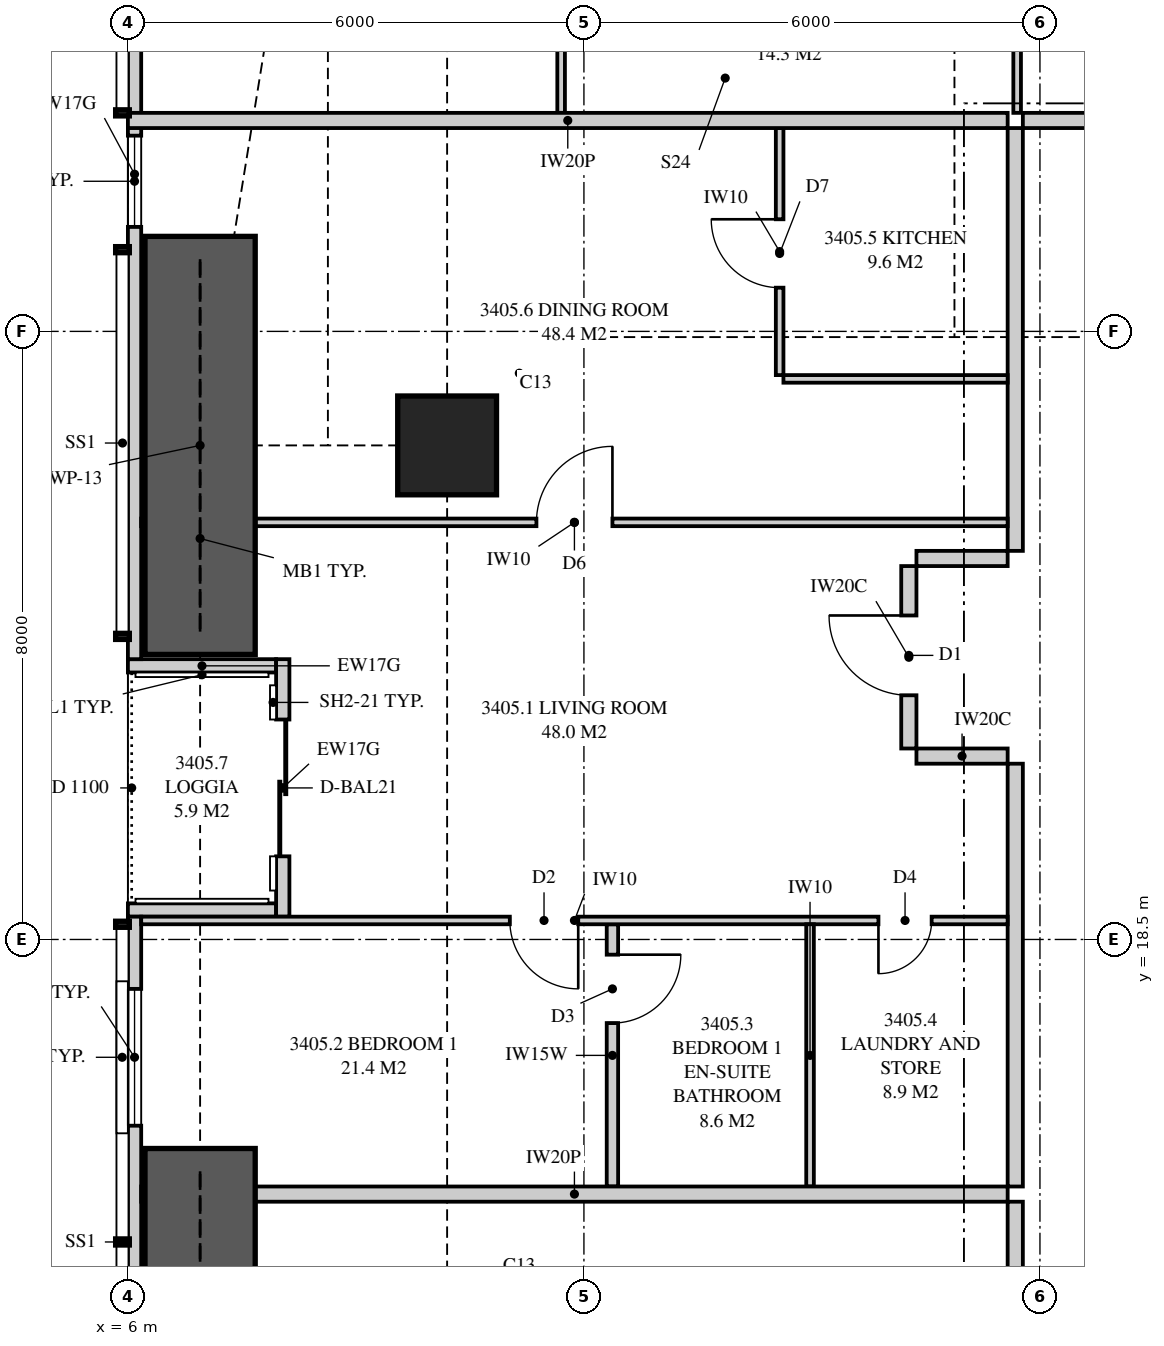
"""IFC4 building model, lengths in metres.
Left out: names, types, materials, properties, quantities, classifications, styles, units other than length and angle.
Written with IfcOpenShell. Run it as: python <this file> out.ifc"""

import sys

from ifc_helpers import new_model, si_unit, direction, frame, frame_2d, origin, origin_2d, place, context, subcontext, project, spatial, polyline, rectangle, outline, extrude, element, fill, save


model = new_model("IFC4")
c1 = context("Model", 3, precision=1e-05, world=origin(), true_north=direction((0.0, 1.0)))
c2 = subcontext(c1, "Body", "Model", "MODEL_VIEW")
j1 = project(units=[si_unit("LENGTHUNIT", "METRE"), si_unit("PLANEANGLEUNIT", "RADIAN")], contexts=[c1])
p1 = place(None, origin())
s1 = spatial("IfcSite", under=j1, at=p1, CompositionType="ELEMENT")
p2 = place(p1, origin())
s2 = spatial("IfcBuilding", under=s1, at=p2, CompositionType="ELEMENT")
p3 = place(p2, frame((0.0, 0.0, 124.95)))
s3 = spatial("IfcBuildingStorey", under=s2, at=p3, CompositionType="ELEMENT", Elevation=124.95)
p4 = place(p3, frame((10.2, 25.0, 0.0), z_axis=(0.0, 0.0, 1.0), x_axis=(1.0, 0.0, 0.0)))
e1 = element("IfcColumn", 1, at=p4, inside=s3, PredefinedType="COLUMN", context=c2, shape_type="SweptSolid", body=[
    extrude(rectangle(XDim=1.3, YDim=1.3, at=origin_2d()), origin(), (0.0, 0.0, 1.0), 3.35),
])
p5 = place(p3, frame((6.087, 34.949, 0.0), z_axis=(0.0, 0.0, 1.0), x_axis=(0.0, -1.0, 0.0)))
e2 = element("IfcWall", 2, at=p5, inside=s3, PredefinedType="SOLIDWALL", context=c2, shape_type="SweptSolid", body=[
    extrude(outline(polyline([(0.0, 0.0), (12.761, 0.0), (12.761, 2.15), (9.949, 2.15), (9.949, 3.11), (9.823, 3.11), (9.823, 2.15), (9.73, 2.15), (9.73, 3.11), (0.0, 3.11), (0.0, 0.0)])), frame((0.0, 0.087, 0.0), z_axis=(0.0, -1.0, 0.0), x_axis=(1.0, 0.0, 0.0)), (0.0, 0.0, 1.0), 0.175),
])
p6 = place(p5, frame((2.618, 0.0, 0.4)))
e3 = element("IfcOpeningElement", 3, at=p6, cuts=e2, PredefinedType="OPENING", context=c2, shape_type="SweptSolid", body=[
    extrude(rectangle(XDim=1.8, YDim=1.7, at=frame_2d((0.9, 0.85))), frame((0.0, 0.097, 0.0), z_axis=(0.0, -1.0, 0.0), x_axis=(1.0, 0.0, 0.0)), (0.0, 0.0, 1.0), 0.195),
])
p7 = place(p5, frame((5.874, 0.0, 0.4)))
e4 = element("IfcOpeningElement", 4, at=p7, cuts=e2, PredefinedType="OPENING", context=c2, shape_type="SweptSolid", body=[
    extrude(rectangle(XDim=1.2, YDim=1.7, at=frame_2d((0.6, 0.85))), frame((0.0, 0.097, 0.0), z_axis=(0.0, -1.0, 0.0), x_axis=(1.0, 0.0, 0.0)), (0.0, 0.0, 1.0), 0.195),
])
p8 = place(p3, frame((6.087, 18.8, 0.0), z_axis=(0.0, 0.0, 1.0), x_axis=(0.0, -1.0, 0.0)))
e5 = element("IfcWall", 5, at=p8, inside=s3, PredefinedType="SOLIDWALL", context=c2, shape_type="SweptSolid", body=[
    extrude(outline(polyline([(0.0, 0.0), (15.749, 0.0), (15.749, 3.11), (6.019, 3.11), (6.019, 2.15), (5.926, 2.15), (5.926, 3.11), (5.8, 3.11), (5.8, 2.15), (0.0, 2.15), (0.0, 0.0)])), frame((0.0, 0.087, 0.0), z_axis=(0.0, -1.0, 0.0), x_axis=(1.0, 0.0, 0.0)), (0.0, 0.0, 1.0), 0.175),
])
p9 = place(p8, frame((0.95, 0.0, 0.4)))
e6 = element("IfcOpeningElement", 6, at=p9, cuts=e5, PredefinedType="OPENING", context=c2, shape_type="SweptSolid", body=[
    extrude(rectangle(XDim=1.8, YDim=1.7, at=frame_2d((0.9, 0.85))), frame((0.0, 0.097, 0.0), z_axis=(0.0, -1.0, 0.0), x_axis=(1.0, 0.0, 0.0)), (0.0, 0.0, 1.0), 0.195),
])
p10 = place(p8, frame((8.76, 0.0, 0.4)))
e7 = element("IfcOpeningElement", 7, at=p10, cuts=e5, PredefinedType="OPENING", context=c2, shape_type="SweptSolid", body=[
    extrude(rectangle(XDim=1.2, YDim=1.7, at=frame_2d((0.6, 0.85))), frame((0.0, 0.097, 0.0), z_axis=(0.0, -1.0, 0.0), x_axis=(1.0, 0.0, 0.0)), (0.0, 0.0, 1.0), 0.195),
])
p11 = place(p8, frame((11.831, 0.0, 0.4)))
e8 = element("IfcOpeningElement", 8, at=p11, cuts=e5, PredefinedType="OPENING", context=c2, shape_type="SweptSolid", body=[
    extrude(rectangle(XDim=1.8, YDim=1.7, at=frame_2d((0.9, 0.85))), frame((0.0, 0.097, 0.0), z_axis=(0.0, -1.0, 0.0), x_axis=(1.0, 0.0, 0.0)), (0.0, 0.0, 1.0), 0.195),
])
p12 = place(p3, frame((8.038, 22.188, 0.0), z_axis=(0.0, 0.0, 1.0), x_axis=(0.0, -1.0, 0.0)))
e9 = element("IfcWall", 9, at=p12, inside=s3, PredefinedType="SOLIDWALL", context=c2, shape_type="SweptSolid", body=[
    extrude(rectangle(XDim=3.387, YDim=0.175, at=frame_2d((1.694, 0.0))), origin(), (0.0, 0.0, 1.0), 3.11),
])
p13 = place(p12, frame((0.794, 0.0, 0.0)))
e10 = element("IfcOpeningElement", 10, at=p13, cuts=e9, PredefinedType="OPENING", context=c2, shape_type="SweptSolid", body=[
    extrude(rectangle(XDim=1.8, YDim=2.1, at=frame_2d((0.9, 1.05))), frame((0.0, 0.097, 0.0), z_axis=(0.0, -1.0, 0.0), x_axis=(1.0, 0.0, 0.0)), (0.0, 0.0, 1.0), 0.195),
])
for number, where, z_axis, x_axis in (
    (11, (6.0, 22.1, 0.0), (0.0, 0.0, 1.0), (1.0, 0.0, 0.0)),
    (12, (6.0, 18.887, 0.0), (0.0, 0.0, 1.0), (1.0, 0.0, 0.0)),
):
    element("IfcWall", number, at=place(p3, frame(where, z_axis=z_axis, x_axis=x_axis)), inside=s3, PredefinedType="SOLIDWALL", context=c2, shape_type="SweptSolid", body=[
        extrude(outline(polyline([(0.0, 0.0), (1.95, 0.0), (1.95, 3.11), (1.75, 3.11), (1.75, 2.15), (0.15, 2.15), (0.15, 3.11), (0.0, 3.11), (0.0, 0.0)])), frame((0.0, 0.087, 0.0), z_axis=(0.0, -1.0, 0.0), x_axis=(1.0, 0.0, 0.0)), (0.0, 0.0, 1.0), 0.175),
    ])
p14 = place(p3, frame((17.775, 29.275, 0.0), z_axis=(0.0, 0.0, 1.0), x_axis=(1.0, 0.0, 0.0)))
e13 = element("IfcWall", 13, at=p14, inside=s3, PredefinedType="PARTITIONING", context=c2, shape_type="SweptSolid", body=[
    extrude(outline(polyline([(0.0, 0.0), (11.425, 0.0), (11.425, 3.11), (10.312, 3.11), (10.312, 2.541), (9.638, 2.541), (9.638, 3.11), (0.0, 3.11), (0.0, 0.0)])), frame((0.0, 0.1, 0.0), z_axis=(0.0, -1.0, 0.0), x_axis=(1.0, 0.0, 0.0)), (0.0, 0.0, 1.0), 0.2),
])
p15 = place(p14, frame((4.625, 0.0, 0.0)))
e14 = element("IfcOpeningElement", 14, at=p15, cuts=e13, PredefinedType="OPENING", context=c2, shape_type="SweptSolid", body=[
    extrude(rectangle(XDim=1.05, YDim=2.2, at=frame_2d((0.525, 1.1))), frame((0.0, 0.11, 0.0), z_axis=(0.0, -1.0, 0.0), x_axis=(1.0, 0.0, 0.0)), (0.0, 0.0, 1.0), 0.22),
])
p16 = place(p3, frame((11.7, 37.825, 0.0), z_axis=(0.0, 0.0, 1.0), x_axis=(0.0, -1.0, 0.0)))
e15 = element("IfcWall", 15, at=p16, inside=s3, PredefinedType="PARTITIONING", context=c2, shape_type="SweptSolid", body=[
    extrude(outline(polyline([(0.0, 0.0), (8.45, 0.0), (8.45, 3.11), (2.708, 3.11), (2.708, 2.15), (0.953, 2.15), (0.953, 3.11), (0.0, 3.11), (0.0, 0.0)])), frame((0.0, 0.05, 0.0), z_axis=(0.0, -1.0, 0.0), x_axis=(1.0, 0.0, 0.0)), (0.0, 0.0, 1.0), 0.1),
])
p17 = place(p16, frame((2.489, 0.0, 0.0)))
e16 = element("IfcOpeningElement", 16, at=p17, cuts=e15, PredefinedType="OPENING", context=c2, shape_type="SweptSolid", body=[
    extrude(rectangle(XDim=0.9, YDim=2.1, at=frame_2d((0.45, 1.05))), frame((0.0, 0.06, 0.0), z_axis=(0.0, -1.0, 0.0), x_axis=(1.0, 0.0, 0.0)), (0.0, 0.0, 1.0), 0.12),
])
p18 = place(p16, frame((5.919, 0.0, 0.0)))
e17 = element("IfcOpeningElement", 17, at=p18, cuts=e15, PredefinedType="OPENING", context=c2, shape_type="SweptSolid", body=[
    extrude(rectangle(XDim=0.9, YDim=2.1, at=frame_2d((0.45, 1.05))), frame((0.0, 0.06, 0.0), z_axis=(0.0, -1.0, 0.0), x_axis=(1.0, 0.0, 0.0)), (0.0, 0.0, 1.0), 0.12),
])
p19 = place(p3, frame((17.7, 37.825, 0.0), z_axis=(0.0, 0.0, 1.0), x_axis=(0.0, -1.0, 0.0)))
e18 = element("IfcWall", 18, at=p19, inside=s3, PredefinedType="PARTITIONING", context=c2, shape_type="SweptSolid", body=[
    extrude(outline(polyline([(1.635, 2.15), (0.0, 2.15), (0.0, 0.0), (8.45, 0.0), (8.45, 3.11), (1.635, 3.11), (1.635, 2.15)]), holes=[polyline([(1.021, 0.116), (0.529, 0.116), (0.529, 0.906), (1.021, 0.906), (1.021, 0.116)]), polyline([(1.021, 1.244), (0.529, 1.244), (0.529, 2.034), (1.021, 2.034), (1.021, 1.244)])]), frame((0.0, 0.05, 0.0), z_axis=(0.0, -1.0, 0.0), x_axis=(1.0, 0.0, 0.0)), (0.0, 0.0, 1.0), 0.1),
])
p20 = place(p19, frame((4.6, 0.0, 0.0)))
e19 = element("IfcOpeningElement", 19, at=p20, cuts=e18, PredefinedType="OPENING", context=c2, shape_type="SweptSolid", body=[
    extrude(rectangle(XDim=0.9, YDim=2.1, at=frame_2d((0.45, 1.05))), frame((0.0, 0.06, 0.0), z_axis=(0.0, -1.0, 0.0), x_axis=(1.0, 0.0, 0.0)), (0.0, 0.0, 1.0), 0.12),
])
p21 = place(p3, frame((6.0, 29.275, 0.0), z_axis=(0.0, 0.0, 1.0), x_axis=(1.0, 0.0, 0.0)))
e20 = element("IfcWall", 20, at=p21, inside=s3, PredefinedType="PARTITIONING", context=c2, shape_type="SweptSolid", body=[
    extrude(outline(polyline([(0.0, 0.0), (11.575, 0.0), (11.575, 3.11), (11.212, 3.11), (11.212, 2.541), (10.538, 2.541), (10.538, 3.11), (5.51, 3.11), (5.51, 2.51), (2.969, 2.51), (2.969, 2.541), (2.565, 2.541), (2.565, 2.15), (0.721, 2.15), (0.721, 3.11), (0.0, 3.11), (0.0, 0.0)])), frame((0.0, 0.1, 0.0), z_axis=(0.0, -1.0, 0.0), x_axis=(1.0, 0.0, 0.0)), (0.0, 0.0, 1.0), 0.2),
])
p22 = place(p3, frame((6.175, 15.15, 0.0), z_axis=(0.0, 0.0, 1.0), x_axis=(1.0, 0.0, 0.0)))
e21 = element("IfcWall", 21, at=p22, inside=s3, PredefinedType="PARTITIONING", context=c2, shape_type="SweptSolid", body=[
    extrude(outline(polyline([(0.529, 2.15), (0.0, 2.15), (0.0, 0.0), (0.529, 0.0), (0.529, 0.034), (1.021, 0.034), (1.021, 0.0), (11.4, 0.0), (11.4, 3.11), (5.335, 3.11), (5.335, 2.51), (2.715, 2.51), (2.715, 3.11), (1.685, 3.11), (1.685, 2.15), (1.021, 2.15), (1.021, 2.116), (0.529, 2.116), (0.529, 2.15)])), frame((0.0, 0.1, 0.0), z_axis=(0.0, -1.0, 0.0), x_axis=(1.0, 0.0, 0.0)), (0.0, 0.0, 1.0), 0.2),
])
p23 = place(p3, frame((17.675, 15.25, 0.0), z_axis=(0.0, 0.0, 1.0), x_axis=(0.0, 1.0, 0.0)))
e22 = element("IfcWall", 22, at=p23, inside=s3, PredefinedType="PARTITIONING", context=c2, shape_type="SweptSolid", body=[
    extrude(rectangle(XDim=5.562, YDim=0.2, at=frame_2d((2.781, 0.0))), origin(), (0.0, 0.0, 1.0), 3.11),
])
p24 = place(p3, frame((6.175, 18.75, 0.0), z_axis=(0.0, 0.0, 1.0), x_axis=(1.0, 0.0, 0.0)))
e23 = element("IfcWall", 23, at=p24, inside=s3, PredefinedType="PARTITIONING", context=c2, shape_type="SweptSolid", body=[
    extrude(outline(polyline([(0.0, 0.0), (11.4, 0.0), (11.4, 3.11), (5.285, 3.11), (5.285, 2.51), (2.765, 2.51), (2.765, 3.11), (1.635, 3.11), (1.635, 2.15), (0.0, 2.15), (0.0, 3.11), (0.0, 0.0)])), frame((0.0, 0.05, 0.0), z_axis=(0.0, -1.0, 0.0), x_axis=(1.0, 0.0, 0.0)), (0.0, 0.0, 1.0), 0.1),
])
p25 = place(p24, frame((4.85, 0.0, 0.0)))
e24 = element("IfcOpeningElement", 24, at=p25, cuts=e23, PredefinedType="OPENING", context=c2, shape_type="SweptSolid", body=[
    extrude(rectangle(XDim=0.9, YDim=2.1, at=frame_2d((0.45, 1.05))), frame((0.0, 0.06, 0.0), z_axis=(0.0, -1.0, 0.0), x_axis=(1.0, 0.0, 0.0)), (0.0, 0.0, 1.0), 0.12),
])
p26 = place(p24, frame((9.7, 0.0, 0.0)))
e25 = element("IfcOpeningElement", 25, at=p26, cuts=e23, PredefinedType="OPENING", context=c2, shape_type="SweptSolid", body=[
    extrude(rectangle(XDim=0.7, YDim=2.1, at=frame_2d((0.35, 1.05))), frame((0.0, 0.06, 0.0), z_axis=(0.0, -1.0, 0.0), x_axis=(1.0, 0.0, 0.0)), (0.0, 0.0, 1.0), 0.12),
])
p27 = place(p3, frame((12.375, 15.25, 0.0), z_axis=(0.0, 0.0, 1.0), x_axis=(0.0, 1.0, 0.0)))
e26 = element("IfcWall", 26, at=p27, inside=s3, PredefinedType="PLUMBINGWALL", context=c2, shape_type="SweptSolid", body=[
    extrude(rectangle(XDim=3.45, YDim=0.15, at=frame_2d((1.725, 0.0))), origin(), (0.0, 0.0, 1.0), 3.11),
])
p28 = place(p27, frame((2.15, 0.0, 0.0)))
e27 = element("IfcOpeningElement", 27, at=p28, cuts=e26, PredefinedType="OPENING", context=c2, shape_type="SweptSolid", body=[
    extrude(rectangle(XDim=0.9, YDim=2.1, at=frame_2d((0.45, 1.05))), frame((0.0, 0.085, 0.0), z_axis=(0.0, -1.0, 0.0), x_axis=(1.0, 0.0, 0.0)), (0.0, 0.0, 1.0), 0.17),
])
p29 = place(p3, frame((14.975, 15.25, 0.0), z_axis=(0.0, 0.0, 1.0), x_axis=(0.0, 1.0, 0.0)))
e28 = element("IfcWall", 28, at=p29, inside=s3, PredefinedType="PARTITIONING", context=c2, shape_type="SweptSolid", body=[
    extrude(rectangle(XDim=3.45, YDim=0.1, at=frame_2d((1.725, 0.0))), origin(), (0.0, 0.0, 1.0), 3.11),
])
p30 = place(p3, frame((14.575, 25.925, 0.0), z_axis=(0.0, 0.0, 1.0), x_axis=(0.0, 1.0, 0.0)))
e29 = element("IfcWall", 29, at=p30, inside=s3, PredefinedType="PARTITIONING", context=c2, shape_type="SweptSolid", body=[
    extrude(outline(polyline([(0.0, 0.0), (3.25, 0.0), (3.25, 3.11), (0.787, 3.11), (0.787, 2.541), (0.213, 2.541), (0.213, 3.11), (0.0, 3.11), (0.0, 0.0)])), frame((0.0, 0.05, 0.0), z_axis=(0.0, -1.0, 0.0), x_axis=(1.0, 0.0, 0.0)), (0.0, 0.0, 1.0), 0.1),
])
p31 = place(p30, frame((1.15, 0.0, 0.0)))
e30 = element("IfcOpeningElement", 30, at=p31, cuts=e29, PredefinedType="OPENING", context=c2, shape_type="SweptSolid", body=[
    extrude(rectangle(XDim=0.9, YDim=2.1, at=frame_2d((0.45, 1.05))), frame((0.0, 0.06, 0.0), z_axis=(0.0, -1.0, 0.0), x_axis=(1.0, 0.0, 0.0)), (0.0, 0.0, 1.0), 0.12),
])
p32 = place(p3, frame((14.625, 25.875, 0.0), z_axis=(0.0, 0.0, 1.0), x_axis=(1.0, 0.0, 0.0)))
e31 = element("IfcWall", 31, at=p32, inside=s3, PredefinedType="PARTITIONING", context=c2, shape_type="SweptSolid", body=[
    extrude(rectangle(XDim=2.95, YDim=0.1, at=frame_2d((1.475, 0.0))), origin(), (0.0, 0.0, 1.0), 3.11),
])
p33 = place(p3, frame((6.175, 23.988, 0.0), z_axis=(0.0, 0.0, 1.0), x_axis=(1.0, 0.0, 0.0)))
e32 = element("IfcWall", 32, at=p33, inside=s3, PredefinedType="PARTITIONING", context=c2, shape_type="SweptSolid", body=[
    extrude(outline(polyline([(0.529, 2.15), (0.0, 2.15), (0.0, 0.0), (0.529, 0.0), (0.529, 0.778), (1.021, 0.778), (1.021, 0.0), (11.4, 0.0), (11.4, 3.11), (5.285, 3.11), (5.285, 2.51), (2.765, 2.51), (2.765, 3.11), (1.635, 3.11), (1.635, 2.15), (1.021, 2.15), (1.021, 1.372), (0.529, 1.372), (0.529, 2.15)])), frame((0.0, 0.05, 0.0), z_axis=(0.0, -1.0, 0.0), x_axis=(1.0, 0.0, 0.0)), (0.0, 0.0, 1.0), 0.1),
])
p34 = place(p33, frame((5.2, 0.0, 0.0)))
e33 = element("IfcOpeningElement", 33, at=p34, cuts=e32, PredefinedType="OPENING", context=c2, shape_type="SweptSolid", body=[
    extrude(rectangle(XDim=1.0, YDim=2.1, at=frame_2d((0.5, 1.05))), frame((0.0, 0.06, 0.0), z_axis=(0.0, -1.0, 0.0), x_axis=(1.0, 0.0, 0.0)), (0.0, 0.0, 1.0), 0.12),
])
p35 = place(p3, frame((17.675, 23.613, 0.0), z_axis=(0.0, 0.0, 1.0), x_axis=(0.0, 1.0, 0.0)))
e34 = element("IfcWall", 34, at=p35, inside=s3, PredefinedType="PARTITIONING", context=c2, shape_type="SweptSolid", body=[
    extrude(outline(polyline([(0.0, 0.0), (5.562, 0.0), (5.562, 3.11), (3.15, 3.11), (3.15, 2.541), (2.475, 2.541), (2.475, 3.11), (0.0, 3.11), (0.0, 0.0)])), frame((0.0, 0.1, 0.0), z_axis=(0.0, -1.0, 0.0), x_axis=(1.0, 0.0, 0.0)), (0.0, 0.0, 1.0), 0.2),
])
p36 = place(p3, frame((16.275, 21.012, 0.0), z_axis=(0.0, 0.0, 1.0), x_axis=(0.0, 1.0, 0.0)))
e35 = element("IfcWall", 35, at=p36, inside=s3, PredefinedType="PARTITIONING", context=c2, shape_type="SweptSolid", body=[
    extrude(rectangle(XDim=2.4, YDim=0.2, at=frame_2d((1.2, 0.0))), origin(), (0.0, 0.0, 1.0), 3.11),
])
p37 = place(p36, frame((0.7, 0.0, 0.0)))
e36 = element("IfcOpeningElement", 36, at=p37, cuts=e35, PredefinedType="OPENING", context=c2, shape_type="SweptSolid", body=[
    extrude(rectangle(XDim=1.05, YDim=2.2, at=frame_2d((0.525, 1.1))), frame((0.0, 0.11, 0.0), z_axis=(0.0, -1.0, 0.0), x_axis=(1.0, 0.0, 0.0)), (0.0, 0.0, 1.0), 0.22),
])
for number, where, z_axis, x_axis in (
    (37, (17.575, 20.913, 0.0), (0.0, 0.0, 1.0), (-1.0, 0.0, 0.0)),
    (38, (17.575, 23.512, 0.0), (0.0, 0.0, 1.0), (-1.0, 0.0, 0.0)),
):
    element("IfcWall", number, at=place(p3, frame(where, z_axis=z_axis, x_axis=x_axis)), inside=s3, PredefinedType="PARTITIONING", context=c2, shape_type="SweptSolid", body=[
        extrude(rectangle(XDim=1.2, YDim=0.2, at=frame_2d((0.6, 0.0))), origin(), (0.0, 0.0, 1.0), 3.11),
    ])
p38 = place(p3, frame((17.675, 13.637, 0.0), z_axis=(0.0, 0.0, 1.0), x_axis=(0.0, 1.0, 0.0)))
e39 = element("IfcWall", 39, at=p38, inside=s3, PredefinedType="PARTITIONING", context=c2, shape_type="SweptSolid", body=[
    extrude(rectangle(XDim=1.413, YDim=0.2, at=frame_2d((0.706, 0.0))), origin(), (0.0, 0.0, 1.0), 3.11),
])
for number, where, z_axis, x_axis in (
    (40, (6.95, 22.25, 0.0), (0.0, 0.0, 1.0), (0.0, 1.0, 0.0)),
    (41, (6.95, 10.25, 0.0), (0.0, 0.0, 1.0), (0.0, 1.0, 0.0)),
):
    element("IfcWall", number, at=place(p3, frame(where, z_axis=z_axis, x_axis=x_axis)), inside=s3, PredefinedType="SHEAR", context=c2, shape_type="SweptSolid", body=[
        extrude(rectangle(XDim=5.5, YDim=1.45, at=frame_2d((2.75, 0.0))), origin(), (0.0, 0.0, 1.0), 3.35),
    ])
p39 = place(p7, origin())
e42 = element("IfcWindow", 42, at=p39, inside=s3, PartitioningType="SINGLE_PANEL", PredefinedType="WINDOW", context=c2, shape_type="SweptSolid", body=[
    extrude(rectangle(XDim=1.2, YDim=1.7, at=frame_2d((0.6, 0.85))), frame((0.0, 0.03, 0.0), z_axis=(0.0, -1.0, 0.0), x_axis=(1.0, 0.0, 0.0)), (0.0, 0.0, 1.0), 0.06),
])
fill(e4, e42)
p40 = place(p13, origin())
e43 = element("IfcDoor", 43, at=p40, inside=s3, OperationType="SLIDING_TO_LEFT", PredefinedType="DOOR", context=c2, shape_type="SweptSolid", body=[
    extrude(rectangle(XDim=1.8, YDim=2.1, at=frame_2d((0.9, 1.05))), frame((0.0, 0.025, 0.0), z_axis=(0.0, -1.0, 0.0), x_axis=(1.0, 0.0, 0.0)), (0.0, 0.0, 1.0), 0.05),
])
fill(e10, e43)
p41 = place(p9, origin())
e44 = element("IfcWindow", 44, at=p41, inside=s3, PartitioningType="SINGLE_PANEL", PredefinedType="WINDOW", context=c2, shape_type="SweptSolid", body=[
    extrude(rectangle(XDim=1.8, YDim=1.7, at=frame_2d((0.9, 0.85))), frame((0.0, 0.03, 0.0), z_axis=(0.0, -1.0, 0.0), x_axis=(1.0, 0.0, 0.0)), (0.0, 0.0, 1.0), 0.06),
])
fill(e6, e44)
p42 = place(p37, origin())
e45 = element("IfcDoor", 45, at=p42, inside=s3, OperationType="SINGLE_SWING_RIGHT", PredefinedType="DOOR", context=c2, shape_type="SweptSolid", body=[
    extrude(rectangle(XDim=1.05, YDim=2.2, at=frame_2d((0.525, 1.1))), frame((0.0, 0.025, 0.0), z_axis=(0.0, -1.0, 0.0), x_axis=(1.0, 0.0, 0.0)), (0.0, 0.0, 1.0), 0.05),
])
fill(e36, e45)
p43 = place(p25, frame((0.9, 0.0, 0.0), z_axis=(0.0, 0.0, 1.0), x_axis=(-1.0, 0.0, 0.0)))
e46 = element("IfcDoor", 46, at=p43, inside=s3, OperationType="SINGLE_SWING_LEFT", PredefinedType="DOOR", context=c2, shape_type="SweptSolid", body=[
    extrude(rectangle(XDim=0.9, YDim=2.1, at=frame_2d((0.45, 1.05))), frame((0.0, 0.025, 0.0), z_axis=(0.0, -1.0, 0.0), x_axis=(1.0, 0.0, 0.0)), (0.0, 0.0, 1.0), 0.05),
])
fill(e24, e46)
p44 = place(p28, frame((0.9, 0.0, 0.0), z_axis=(0.0, 0.0, 1.0), x_axis=(-1.0, 0.0, 0.0)))
e47 = element("IfcDoor", 47, at=p44, inside=s3, OperationType="SINGLE_SWING_LEFT", PredefinedType="DOOR", context=c2, shape_type="SweptSolid", body=[
    extrude(rectangle(XDim=0.9, YDim=2.1, at=frame_2d((0.45, 1.05))), frame((0.0, 0.025, 0.0), z_axis=(0.0, -1.0, 0.0), x_axis=(1.0, 0.0, 0.0)), (0.0, 0.0, 1.0), 0.05),
])
fill(e27, e47)
p45 = place(p26, frame((0.7, 0.0, 0.0), z_axis=(0.0, 0.0, 1.0), x_axis=(-1.0, 0.0, 0.0)))
e48 = element("IfcDoor", 48, at=p45, inside=s3, OperationType="SINGLE_SWING_RIGHT", PredefinedType="DOOR", context=c2, shape_type="SweptSolid", body=[
    extrude(rectangle(XDim=0.7, YDim=2.1, at=frame_2d((0.35, 1.05))), frame((0.0, 0.025, 0.0), z_axis=(0.0, -1.0, 0.0), x_axis=(1.0, 0.0, 0.0)), (0.0, 0.0, 1.0), 0.05),
])
fill(e25, e48)
p46 = place(p31, origin())
e49 = element("IfcDoor", 49, at=p46, inside=s3, OperationType="SINGLE_SWING_RIGHT", PredefinedType="DOOR", context=c2, shape_type="SweptSolid", body=[
    extrude(rectangle(XDim=0.9, YDim=2.1, at=frame_2d((0.45, 1.05))), frame((0.0, 0.025, 0.0), z_axis=(0.0, -1.0, 0.0), x_axis=(1.0, 0.0, 0.0)), (0.0, 0.0, 1.0), 0.05),
])
fill(e30, e49)
p47 = place(p34, origin())
e50 = element("IfcDoor", 50, at=p47, inside=s3, OperationType="SINGLE_SWING_RIGHT", PredefinedType="DOOR", context=c2, shape_type="SweptSolid", body=[
    extrude(rectangle(XDim=1.0, YDim=2.1, at=frame_2d((0.5, 1.05))), frame((0.0, 0.025, 0.0), z_axis=(0.0, -1.0, 0.0), x_axis=(1.0, 0.0, 0.0)), (0.0, 0.0, 1.0), 0.05),
])
fill(e33, e50)
save(model, sys.argv[1])
